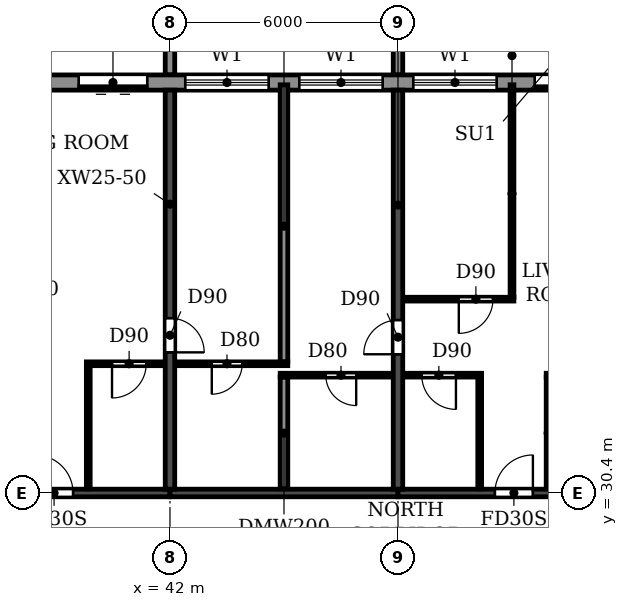
"""IFC4 building model, lengths in metres.
Left out: names, types, materials, properties, quantities, classifications, styles, units other than length and angle.
Written with IfcOpenShell. Run it as: python <this file> out.ifc"""

import sys

from ifc_helpers import new_model, si_unit, direction, frame, frame_2d, origin, place, context, subcontext, project, spatial, polyline, rectangle, outline, extrude, source, transform, mapped, element, fill, save


model = new_model("IFC4")
c1 = context("Model", 3, precision=1e-05, world=origin(), true_north=direction((0.0, 1.0)))
c2 = subcontext(c1, "Body", "Model", "MODEL_VIEW")
j1 = project(units=[si_unit("LENGTHUNIT", "METRE"), si_unit("PLANEANGLEUNIT", "RADIAN")], contexts=[c1])
p1 = place(None, origin())
s1 = spatial("IfcSite", under=j1, at=p1, CompositionType="ELEMENT")
p2 = place(p1, origin())
s2 = spatial("IfcBuilding", under=s1, at=p2, CompositionType="ELEMENT")
p3 = place(p2, frame((0.0, 0.0, 257.7)))
s3 = spatial("IfcBuildingStorey", under=s2, at=p3, CompositionType="ELEMENT", Elevation=257.7)
p4 = place(p3, frame((42.0, 30.5, 0.0), z_axis=(0.0, 0.0, 1.0), x_axis=(0.0, 1.0, 0.0)))
e1 = element("IfcWall", 1, at=p4, inside=s3, PredefinedType="SHEAR", context=c2, shape_type="SweptSolid", body=[
    extrude(rectangle(XDim=10.5, YDim=0.25, at=frame_2d((5.25, 0.0))), origin(), (0.0, 0.0, 1.0), 3.0),
])
p5 = place(p4, frame((3.6, 0.0, 0.0)))
e2 = element("IfcOpeningElement", 2, at=p5, cuts=e1, PredefinedType="OPENING", context=c2, shape_type="SweptSolid", body=[
    extrude(rectangle(XDim=0.9, YDim=2.1, at=frame_2d((0.45, 1.05))), frame((0.0, 0.135, 0.0), z_axis=(0.0, -1.0, 0.0), x_axis=(1.0, 0.0, 0.0)), (0.0, 0.0, 1.0), 0.27),
])
p6 = place(p3, frame((48.0, 30.5, 0.0), z_axis=(0.0, 0.0, 1.0), x_axis=(0.0, 1.0, 0.0)))
e3 = element("IfcWall", 3, at=p6, inside=s3, PredefinedType="SHEAR", context=c2, shape_type="SweptSolid", body=[
    extrude(rectangle(XDim=10.5, YDim=0.25, at=frame_2d((5.25, 0.0))), origin(), (0.0, 0.0, 1.0), 3.0),
])
p7 = place(p6, frame((3.55, 0.0, 0.0)))
e4 = element("IfcOpeningElement", 4, at=p7, cuts=e3, PredefinedType="OPENING", context=c2, shape_type="SweptSolid", body=[
    extrude(rectangle(XDim=0.9, YDim=2.1, at=frame_2d((0.45, 1.05))), frame((0.0, 0.135, 0.0), z_axis=(0.0, -1.0, 0.0), x_axis=(1.0, 0.0, 0.0)), (0.0, 0.0, 1.0), 0.27),
])
p8 = place(p3, frame((36.0, 30.4, 0.0), z_axis=(0.0, 0.0, 1.0), x_axis=(1.0, 0.0, 0.0)))
e5 = element("IfcWall", 5, at=p8, inside=s3, PredefinedType="SHEAR", context=c2, shape_type="SweptSolid", body=[
    extrude(rectangle(XDim=6.0, YDim=0.2, at=frame_2d((3.0, 0.0))), origin(), (0.0, 0.0, 1.0), 2.4),
])
p9 = place(p8, frame((2.45, 0.0, 0.0)))
e6 = element("IfcOpeningElement", 6, at=p9, cuts=e5, PredefinedType="OPENING", context=c2, shape_type="SweptSolid", body=[
    extrude(rectangle(XDim=1.0, YDim=2.1, at=frame_2d((0.5, 1.05))), frame((0.0, 0.11, 0.0), z_axis=(0.0, -1.0, 0.0), x_axis=(1.0, 0.0, 0.0)), (0.0, 0.0, 1.0), 0.22),
])
p10 = place(p3, frame((42.0, 30.4, 0.0), z_axis=(0.0, 0.0, 1.0), x_axis=(1.0, 0.0, 0.0)))
e7 = element("IfcWall", 7, at=p10, inside=s3, PredefinedType="SHEAR", context=c2, shape_type="SweptSolid", body=[
    extrude(rectangle(XDim=6.0, YDim=0.2, at=frame_2d((3.0, 0.0))), origin(), (0.0, 0.0, 1.0), 2.4),
])
p11 = place(p3, frame((48.0, 30.4, 0.0), z_axis=(0.0, 0.0, 1.0), x_axis=(1.0, 0.0, 0.0)))
e8 = element("IfcWall", 8, at=p11, inside=s3, PredefinedType="SHEAR", context=c2, shape_type="SweptSolid", body=[
    extrude(rectangle(XDim=6.0, YDim=0.2, at=frame_2d((3.0, 0.0))), origin(), (0.0, 0.0, 1.0), 2.4),
])
p12 = place(p11, frame((2.55, 0.0, 0.0)))
e9 = element("IfcOpeningElement", 9, at=p12, cuts=e8, PredefinedType="OPENING", context=c2, shape_type="SweptSolid", body=[
    extrude(rectangle(XDim=1.0, YDim=2.1, at=frame_2d((0.5, 1.05))), frame((0.0, 0.11, 0.0), z_axis=(0.0, -1.0, 0.0), x_axis=(1.0, 0.0, 0.0)), (0.0, 0.0, 1.0), 0.22),
])
p13 = place(p3, frame((79.317, 41.2, 0.0), z_axis=(0.0, 0.0, 1.0), x_axis=(-1.0, 0.0, 0.0)))
e10 = element("IfcWall", 10, at=p13, inside=s3, PredefinedType="STANDARD", context=c2, shape_type="SweptSolid", body=[
    extrude(rectangle(XDim=56.634, YDim=0.4, at=frame_2d((28.317, 0.0))), origin(), (0.0, 0.0, 1.0), 3.0),
])
p14 = place(p13, frame((52.717, 0.0, 0.9)))
e11 = element("IfcOpeningElement", 11, at=p14, cuts=e10, PredefinedType="OPENING", context=c2, shape_type="SweptSolid", body=[
    extrude(rectangle(XDim=2.2, YDim=1.5, at=frame_2d((1.1, 0.75))), frame((0.0, 0.21, 0.0), z_axis=(0.0, -1.0, 0.0), x_axis=(1.0, 0.0, 0.0)), (0.0, 0.0, 1.0), 0.42),
])
p15 = place(p13, frame((49.717, 0.0, 0.9)))
e12 = element("IfcOpeningElement", 12, at=p15, cuts=e10, PredefinedType="OPENING", context=c2, shape_type="SweptSolid", body=[
    extrude(rectangle(XDim=2.2, YDim=1.5, at=frame_2d((1.1, 0.75))), frame((0.0, 0.21, 0.0), z_axis=(0.0, -1.0, 0.0), x_axis=(1.0, 0.0, 0.0)), (0.0, 0.0, 1.0), 0.42),
])
p16 = place(p13, frame((46.717, 0.0, 0.9)))
e13 = element("IfcOpeningElement", 13, at=p16, cuts=e10, PredefinedType="OPENING", context=c2, shape_type="SweptSolid", body=[
    extrude(rectangle(XDim=2.2, YDim=1.5, at=frame_2d((1.1, 0.75))), frame((0.0, 0.21, 0.0), z_axis=(0.0, -1.0, 0.0), x_axis=(1.0, 0.0, 0.0)), (0.0, 0.0, 1.0), 0.42),
])
p17 = place(p13, frame((43.917, 0.0, 0.0)))
e14 = element("IfcOpeningElement", 14, at=p17, cuts=e10, PredefinedType="OPENING", context=c2, shape_type="SweptSolid", body=[
    extrude(rectangle(XDim=1.8, YDim=2.4, at=frame_2d((0.9, 1.2))), frame((0.0, 0.21, 0.0), z_axis=(0.0, -1.0, 0.0), x_axis=(1.0, 0.0, 0.0)), (0.0, 0.0, 1.0), 0.42),
])
p18 = place(p13, frame((40.717, 0.0, 0.9)))
e15 = element("IfcOpeningElement", 15, at=p18, cuts=e10, PredefinedType="OPENING", context=c2, shape_type="SweptSolid", body=[
    extrude(rectangle(XDim=2.2, YDim=1.5, at=frame_2d((1.1, 0.75))), frame((0.0, 0.21, 0.0), z_axis=(0.0, -1.0, 0.0), x_axis=(1.0, 0.0, 0.0)), (0.0, 0.0, 1.0), 0.42),
])
p19 = place(p13, frame((37.917, 0.0, 0.0)))
e16 = element("IfcOpeningElement", 16, at=p19, cuts=e10, PredefinedType="OPENING", context=c2, shape_type="SweptSolid", body=[
    extrude(rectangle(XDim=1.8, YDim=2.4, at=frame_2d((0.9, 1.2))), frame((0.0, 0.21, 0.0), z_axis=(0.0, -1.0, 0.0), x_axis=(1.0, 0.0, 0.0)), (0.0, 0.0, 1.0), 0.42),
])
p20 = place(p13, frame((34.717, 0.0, 0.9)))
e17 = element("IfcOpeningElement", 17, at=p20, cuts=e10, PredefinedType="OPENING", context=c2, shape_type="SweptSolid", body=[
    extrude(rectangle(XDim=2.2, YDim=1.5, at=frame_2d((1.1, 0.75))), frame((0.0, 0.21, 0.0), z_axis=(0.0, -1.0, 0.0), x_axis=(1.0, 0.0, 0.0)), (0.0, 0.0, 1.0), 0.42),
])
p21 = place(p13, frame((31.717, 0.0, 0.9)))
e18 = element("IfcOpeningElement", 18, at=p21, cuts=e10, PredefinedType="OPENING", context=c2, shape_type="SweptSolid", body=[
    extrude(rectangle(XDim=2.2, YDim=1.5, at=frame_2d((1.1, 0.75))), frame((0.0, 0.21, 0.0), z_axis=(0.0, -1.0, 0.0), x_axis=(1.0, 0.0, 0.0)), (0.0, 0.0, 1.0), 0.42),
])
p22 = place(p13, frame((28.717, 0.0, 0.9)))
e19 = element("IfcOpeningElement", 19, at=p22, cuts=e10, PredefinedType="OPENING", context=c2, shape_type="SweptSolid", body=[
    extrude(rectangle(XDim=2.2, YDim=1.5, at=frame_2d((1.1, 0.75))), frame((0.0, 0.21, 0.0), z_axis=(0.0, -1.0, 0.0), x_axis=(1.0, 0.0, 0.0)), (0.0, 0.0, 1.0), 0.42),
])
p23 = place(p13, frame((25.917, 0.0, 0.0)))
e20 = element("IfcOpeningElement", 20, at=p23, cuts=e10, PredefinedType="OPENING", context=c2, shape_type="SweptSolid", body=[
    extrude(rectangle(XDim=1.8, YDim=2.4, at=frame_2d((0.9, 1.2))), frame((0.0, 0.21, 0.0), z_axis=(0.0, -1.0, 0.0), x_axis=(1.0, 0.0, 0.0)), (0.0, 0.0, 1.0), 0.42),
])
p24 = place(p13, frame((22.917, 0.0, 0.0)))
e21 = element("IfcOpeningElement", 21, at=p24, cuts=e10, PredefinedType="OPENING", context=c2, shape_type="SweptSolid", body=[
    extrude(rectangle(XDim=1.8, YDim=2.4, at=frame_2d((0.9, 1.2))), frame((0.0, 0.21, 0.0), z_axis=(0.0, -1.0, 0.0), x_axis=(1.0, 0.0, 0.0)), (0.0, 0.0, 1.0), 0.42),
])
p25 = place(p13, frame((19.717, 0.0, 0.9)))
e22 = element("IfcOpeningElement", 22, at=p25, cuts=e10, PredefinedType="OPENING", context=c2, shape_type="SweptSolid", body=[
    extrude(rectangle(XDim=2.2, YDim=1.5, at=frame_2d((1.1, 0.75))), frame((0.0, 0.21, 0.0), z_axis=(0.0, -1.0, 0.0), x_axis=(1.0, 0.0, 0.0)), (0.0, 0.0, 1.0), 0.42),
])
p26 = place(p13, frame((16.717, 0.0, 0.9)))
e23 = element("IfcOpeningElement", 23, at=p26, cuts=e10, PredefinedType="OPENING", context=c2, shape_type="SweptSolid", body=[
    extrude(rectangle(XDim=2.2, YDim=1.5, at=frame_2d((1.1, 0.75))), frame((0.0, 0.21, 0.0), z_axis=(0.0, -1.0, 0.0), x_axis=(1.0, 0.0, 0.0)), (0.0, 0.0, 1.0), 0.42),
])
p27 = place(p13, frame((13.717, 0.0, 0.9)))
e24 = element("IfcOpeningElement", 24, at=p27, cuts=e10, PredefinedType="OPENING", context=c2, shape_type="SweptSolid", body=[
    extrude(rectangle(XDim=2.2, YDim=1.5, at=frame_2d((1.1, 0.75))), frame((0.0, 0.21, 0.0), z_axis=(0.0, -1.0, 0.0), x_axis=(1.0, 0.0, 0.0)), (0.0, 0.0, 1.0), 0.42),
])
p28 = place(p13, frame((10.717, 0.0, 0.9)))
e25 = element("IfcOpeningElement", 25, at=p28, cuts=e10, PredefinedType="OPENING", context=c2, shape_type="SweptSolid", body=[
    extrude(rectangle(XDim=2.2, YDim=1.5, at=frame_2d((1.1, 0.75))), frame((0.0, 0.21, 0.0), z_axis=(0.0, -1.0, 0.0), x_axis=(1.0, 0.0, 0.0)), (0.0, 0.0, 1.0), 0.42),
])
p29 = place(p13, frame((7.917, 0.0, 0.0)))
e26 = element("IfcOpeningElement", 26, at=p29, cuts=e10, PredefinedType="OPENING", context=c2, shape_type="SweptSolid", body=[
    extrude(rectangle(XDim=1.8, YDim=2.4, at=frame_2d((0.9, 1.2))), frame((0.0, 0.21, 0.0), z_axis=(0.0, -1.0, 0.0), x_axis=(1.0, 0.0, 0.0)), (0.0, 0.0, 1.0), 0.42),
])
p30 = place(p13, frame((4.717, 0.0, 0.9)))
e27 = element("IfcOpeningElement", 27, at=p30, cuts=e10, PredefinedType="OPENING", context=c2, shape_type="SweptSolid", body=[
    extrude(rectangle(XDim=2.2, YDim=1.5, at=frame_2d((1.1, 0.75))), frame((0.0, 0.21, 0.0), z_axis=(0.0, -1.0, 0.0), x_axis=(1.0, 0.0, 0.0)), (0.0, 0.0, 1.0), 0.42),
])
p31 = place(p13, frame((1.917, 0.0, 0.0)))
e28 = element("IfcOpeningElement", 28, at=p31, cuts=e10, PredefinedType="OPENING", context=c2, shape_type="SweptSolid", body=[
    extrude(rectangle(XDim=1.8, YDim=2.4, at=frame_2d((0.9, 1.2))), frame((0.0, 0.21, 0.0), z_axis=(0.0, -1.0, 0.0), x_axis=(1.0, 0.0, 0.0)), (0.0, 0.0, 1.0), 0.42),
])
m1 = source(origin(), c2, "Body", "SweptSolid", [
    extrude(outline(polyline([(0.0, 0.0), (0.25, 0.0), (0.25, 3.1), (0.0, 3.1), (0.0, 0.0)])), origin(), (0.0, 0.0, 1.0), 3.1),
])
for number, where in (
    (29, (41.875, 41.4, 0.0)),
    (30, (47.875, 41.4, 0.0)),
):
    element("IfcWall", number, at=place(p3, frame(where)), inside=s3, PredefinedType="STANDARD", context=c2, shape_type="MappedRepresentation", body=[
        mapped(m1, transform((0.0, 0.0, 0.0))),
    ])
p32 = place(p3, frame((45.0, 30.51, 0.0), z_axis=(0.0, 0.0, 1.0), x_axis=(0.0, 1.0, 0.0)))
e31 = element("IfcWall", 31, at=p32, inside=s3, PredefinedType="PARTITIONING", context=c2, shape_type="SweptSolid", body=[
    extrude(rectangle(XDim=2.94, YDim=0.2, at=frame_2d((1.47, 0.0))), origin(), (0.0, 0.0, 1.0), 3.0),
])
p33 = place(p3, frame((45.0, 33.85, 0.0), z_axis=(0.0, 0.0, 1.0), x_axis=(0.0, 1.0, 0.0)))
e32 = element("IfcWall", 32, at=p33, inside=s3, PredefinedType="PARTITIONING", context=c2, shape_type="SweptSolid", body=[
    extrude(rectangle(XDim=7.29, YDim=0.2, at=frame_2d((3.645, 0.0))), origin(), (0.0, 0.0, 1.0), 3.0),
])
p34 = place(p3, frame((44.9, 33.5, 0.0), z_axis=(0.0, 0.0, 1.0), x_axis=(1.0, 0.0, 0.0)))
e33 = element("IfcWall", 33, at=p34, inside=s3, PredefinedType="PARTITIONING", context=c2, shape_type="SweptSolid", body=[
    extrude(rectangle(XDim=2.965, YDim=0.1, at=frame_2d((1.482, 0.0))), origin(), (0.0, 0.0, 1.0), 3.0),
])
p35 = place(p34, frame((1.2, 0.0, 0.0)))
e34 = element("IfcOpeningElement", 34, at=p35, cuts=e33, PredefinedType="OPENING", context=c2, shape_type="SweptSolid", body=[
    extrude(rectangle(XDim=0.8, YDim=2.1, at=frame_2d((0.4, 1.05))), frame((0.0, 0.06, 0.0), z_axis=(0.0, -1.0, 0.0), x_axis=(1.0, 0.0, 0.0)), (0.0, 0.0, 1.0), 0.12),
])
p36 = place(p3, frame((48.135, 33.5, 0.0), z_axis=(0.0, 0.0, 1.0), x_axis=(1.0, 0.0, 0.0)))
e35 = element("IfcWall", 35, at=p36, inside=s3, PredefinedType="PARTITIONING", context=c2, shape_type="SweptSolid", body=[
    extrude(rectangle(XDim=2.065, YDim=0.1, at=frame_2d((1.032, 0.0))), origin(), (0.0, 0.0, 1.0), 3.0),
])
p37 = place(p36, frame((0.49, 0.0, 0.0)))
e36 = element("IfcOpeningElement", 36, at=p37, cuts=e35, PredefinedType="OPENING", context=c2, shape_type="SweptSolid", body=[
    extrude(rectangle(XDim=0.9, YDim=2.1, at=frame_2d((0.45, 1.05))), frame((0.0, 0.06, 0.0), z_axis=(0.0, -1.0, 0.0), x_axis=(1.0, 0.0, 0.0)), (0.0, 0.0, 1.0), 0.12),
])
p38 = place(p3, frame((51.9, 33.5, 0.0), z_axis=(0.0, 0.0, 1.0), x_axis=(1.0, 0.0, 0.0)))
e37 = element("IfcWall", 37, at=p38, inside=s3, PredefinedType="PARTITIONING", context=c2, shape_type="SweptSolid", body=[
    extrude(rectangle(XDim=1.965, YDim=0.1, at=frame_2d((0.982, 0.0))), origin(), (0.0, 0.0, 1.0), 3.0),
])
p39 = place(p38, frame((0.675, 0.0, 0.0)))
e38 = element("IfcOpeningElement", 38, at=p39, cuts=e37, PredefinedType="OPENING", context=c2, shape_type="SweptSolid", body=[
    extrude(rectangle(XDim=0.8, YDim=2.1, at=frame_2d((0.4, 1.05))), frame((0.0, 0.06, 0.0), z_axis=(0.0, -1.0, 0.0), x_axis=(1.0, 0.0, 0.0)), (0.0, 0.0, 1.0), 0.12),
])
p40 = place(p3, frame((39.8, 33.8, 0.0), z_axis=(0.0, 0.0, 1.0), x_axis=(1.0, 0.0, 0.0)))
e39 = element("IfcWall", 39, at=p40, inside=s3, PredefinedType="PARTITIONING", context=c2, shape_type="SweptSolid", body=[
    extrude(rectangle(XDim=2.065, YDim=0.1, at=frame_2d((1.032, 0.0))), origin(), (0.0, 0.0, 1.0), 3.0),
])
p41 = place(p40, frame((0.675, 0.0, 0.0)))
e40 = element("IfcOpeningElement", 40, at=p41, cuts=e39, PredefinedType="OPENING", context=c2, shape_type="SweptSolid", body=[
    extrude(rectangle(XDim=0.9, YDim=2.1, at=frame_2d((0.45, 1.05))), frame((0.0, 0.06, 0.0), z_axis=(0.0, -1.0, 0.0), x_axis=(1.0, 0.0, 0.0)), (0.0, 0.0, 1.0), 0.12),
])
p42 = place(p3, frame((42.135, 33.8, 0.0), z_axis=(0.0, 0.0, 1.0), x_axis=(1.0, 0.0, 0.0)))
e41 = element("IfcWall", 41, at=p42, inside=s3, PredefinedType="PARTITIONING", context=c2, shape_type="SweptSolid", body=[
    extrude(rectangle(XDim=2.965, YDim=0.1, at=frame_2d((1.482, 0.0))), origin(), (0.0, 0.0, 1.0), 3.0),
])
p43 = place(p42, frame((0.965, 0.0, 0.0)))
e42 = element("IfcOpeningElement", 42, at=p43, cuts=e41, PredefinedType="OPENING", context=c2, shape_type="SweptSolid", body=[
    extrude(rectangle(XDim=0.8, YDim=2.1, at=frame_2d((0.4, 1.05))), frame((0.0, 0.06, 0.0), z_axis=(0.0, -1.0, 0.0), x_axis=(1.0, 0.0, 0.0)), (0.0, 0.0, 1.0), 0.12),
])
p44 = place(p3, frame((48.135, 35.5, 0.0), z_axis=(0.0, 0.0, 1.0), x_axis=(1.0, 0.0, 0.0)))
e43 = element("IfcWall", 43, at=p44, inside=s3, PredefinedType="PARTITIONING", context=c2, shape_type="SweptSolid", body=[
    extrude(rectangle(XDim=2.915, YDim=0.1, at=frame_2d((1.458, 0.0))), origin(), (0.0, 0.0, 1.0), 3.0),
])
p45 = place(p44, frame((1.465, 0.0, 0.0)))
e44 = element("IfcOpeningElement", 44, at=p45, cuts=e43, PredefinedType="OPENING", context=c2, shape_type="SweptSolid", body=[
    extrude(rectangle(XDim=0.9, YDim=2.1, at=frame_2d((0.45, 1.05))), frame((0.0, 0.06, 0.0), z_axis=(0.0, -1.0, 0.0), x_axis=(1.0, 0.0, 0.0)), (0.0, 0.0, 1.0), 0.12),
])
p46 = place(p3, frame((39.85, 30.51, 0.0), z_axis=(0.0, 0.0, 1.0), x_axis=(0.0, 1.0, 0.0)))
e45 = element("IfcWall", 45, at=p46, inside=s3, PredefinedType="PARTITIONING", context=c2, shape_type="SweptSolid", body=[
    extrude(rectangle(XDim=3.24, YDim=0.1, at=frame_2d((1.62, 0.0))), origin(), (0.0, 0.0, 1.0), 3.0),
])
p47 = place(p3, frame((50.15, 30.51, 0.0), z_axis=(0.0, 0.0, 1.0), x_axis=(0.0, 1.0, 0.0)))
e46 = element("IfcWall", 46, at=p47, inside=s3, PredefinedType="PARTITIONING", context=c2, shape_type="SweptSolid", body=[
    extrude(rectangle(XDim=2.94, YDim=0.1, at=frame_2d((1.47, 0.0))), origin(), (0.0, 0.0, 1.0), 3.0),
])
p48 = place(p3, frame((51.0, 35.55, 0.0), z_axis=(0.0, 0.0, 1.0), x_axis=(0.0, 1.0, 0.0)))
e47 = element("IfcWall", 47, at=p48, inside=s3, PredefinedType="PARTITIONING", context=c2, shape_type="SweptSolid", body=[
    extrude(rectangle(XDim=5.59, YDim=0.1, at=frame_2d((2.795, 0.0))), origin(), (0.0, 0.0, 1.0), 3.0),
])
p49 = place(p3, frame((51.95, 30.51, 0.0), z_axis=(0.0, 0.0, 1.0), x_axis=(0.0, 1.0, 0.0)))
e48 = element("IfcWall", 48, at=p49, inside=s3, PredefinedType="PARTITIONING", context=c2, shape_type="SweptSolid", body=[
    extrude(rectangle(XDim=2.94, YDim=0.1, at=frame_2d((1.47, 0.0))), origin(), (0.0, 0.0, 1.0), 3.0),
])
p50 = place(p19, origin())
e49 = element("IfcDoor", 49, at=p50, inside=s3, OperationType="DOUBLE_DOOR_SLIDING", PredefinedType="DOOR", context=c2, shape_type="SweptSolid", body=[
    extrude(rectangle(XDim=1.8, YDim=2.4, at=frame_2d((0.9, 1.2))), frame((0.0, 0.025, 0.0), z_axis=(0.0, -1.0, 0.0), x_axis=(1.0, 0.0, 0.0)), (0.0, 0.0, 1.0), 0.05),
])
fill(e16, e49)
p51 = place(p20, origin())
e50 = element("IfcWindow", 50, at=p51, inside=s3, PartitioningType="DOUBLE_PANEL_HORIZONTAL", PredefinedType="WINDOW", context=c2, shape_type="SweptSolid", body=[
    extrude(rectangle(XDim=2.2, YDim=1.5, at=frame_2d((1.1, 0.75))), frame((0.0, 0.03, 0.0), z_axis=(0.0, -1.0, 0.0), x_axis=(1.0, 0.0, 0.0)), (0.0, 0.0, 1.0), 0.06),
])
fill(e17, e50)
p52 = place(p21, origin())
e51 = element("IfcWindow", 51, at=p52, inside=s3, PartitioningType="DOUBLE_PANEL_HORIZONTAL", PredefinedType="WINDOW", context=c2, shape_type="SweptSolid", body=[
    extrude(rectangle(XDim=2.2, YDim=1.5, at=frame_2d((1.1, 0.75))), frame((0.0, 0.03, 0.0), z_axis=(0.0, -1.0, 0.0), x_axis=(1.0, 0.0, 0.0)), (0.0, 0.0, 1.0), 0.06),
])
fill(e18, e51)
p53 = place(p22, origin())
e52 = element("IfcWindow", 52, at=p53, inside=s3, PartitioningType="DOUBLE_PANEL_HORIZONTAL", PredefinedType="WINDOW", context=c2, shape_type="SweptSolid", body=[
    extrude(rectangle(XDim=2.2, YDim=1.5, at=frame_2d((1.1, 0.75))), frame((0.0, 0.03, 0.0), z_axis=(0.0, -1.0, 0.0), x_axis=(1.0, 0.0, 0.0)), (0.0, 0.0, 1.0), 0.06),
])
fill(e19, e52)
p54 = place(p23, origin())
e53 = element("IfcDoor", 53, at=p54, inside=s3, OperationType="DOUBLE_DOOR_SLIDING", PredefinedType="DOOR", context=c2, shape_type="SweptSolid", body=[
    extrude(rectangle(XDim=1.8, YDim=2.4, at=frame_2d((0.9, 1.2))), frame((0.0, 0.025, 0.0), z_axis=(0.0, -1.0, 0.0), x_axis=(1.0, 0.0, 0.0)), (0.0, 0.0, 1.0), 0.05),
])
fill(e20, e53)
p55 = place(p43, frame((0.8, 0.0, 0.0), z_axis=(0.0, 0.0, 1.0), x_axis=(-1.0, 0.0, 0.0)))
e54 = element("IfcDoor", 54, at=p55, inside=s3, OperationType="SINGLE_SWING_RIGHT", PredefinedType="DOOR", context=c2, shape_type="SweptSolid", body=[
    extrude(rectangle(XDim=0.8, YDim=2.1, at=frame_2d((0.4, 1.05))), frame((0.0, 0.025, 0.0), z_axis=(0.0, -1.0, 0.0), x_axis=(1.0, 0.0, 0.0)), (0.0, 0.0, 1.0), 0.05),
])
fill(e42, e54)
p56 = place(p9, origin())
e55 = element("IfcDoor", 55, at=p56, inside=s3, OperationType="SINGLE_SWING_LEFT", PredefinedType="DOOR", context=c2, shape_type="SweptSolid", body=[
    extrude(rectangle(XDim=1.0, YDim=2.1, at=frame_2d((0.5, 1.05))), frame((0.0, 0.025, 0.0), z_axis=(0.0, -1.0, 0.0), x_axis=(1.0, 0.0, 0.0)), (0.0, 0.0, 1.0), 0.05),
])
fill(e6, e55)
p57 = place(p41, frame((0.9, 0.0, 0.0), z_axis=(0.0, 0.0, 1.0), x_axis=(-1.0, 0.0, 0.0)))
e56 = element("IfcDoor", 56, at=p57, inside=s3, OperationType="SINGLE_SWING_RIGHT", PredefinedType="DOOR", context=c2, shape_type="SweptSolid", body=[
    extrude(rectangle(XDim=0.9, YDim=2.1, at=frame_2d((0.45, 1.05))), frame((0.0, 0.025, 0.0), z_axis=(0.0, -1.0, 0.0), x_axis=(1.0, 0.0, 0.0)), (0.0, 0.0, 1.0), 0.05),
])
fill(e40, e56)
p58 = place(p5, frame((0.9, 0.0, 0.0), z_axis=(0.0, 0.0, 1.0), x_axis=(-1.0, 0.0, 0.0)))
e57 = element("IfcDoor", 57, at=p58, inside=s3, OperationType="SINGLE_SWING_RIGHT", PredefinedType="DOOR", context=c2, shape_type="SweptSolid", body=[
    extrude(rectangle(XDim=0.9, YDim=2.1, at=frame_2d((0.45, 1.05))), frame((0.0, 0.025, 0.0), z_axis=(0.0, -1.0, 0.0), x_axis=(1.0, 0.0, 0.0)), (0.0, 0.0, 1.0), 0.05),
])
fill(e2, e57)
p59 = place(p35, frame((0.8, 0.0, 0.0), z_axis=(0.0, 0.0, 1.0), x_axis=(-1.0, 0.0, 0.0)))
e58 = element("IfcDoor", 58, at=p59, inside=s3, OperationType="SINGLE_SWING_LEFT", PredefinedType="DOOR", context=c2, shape_type="SweptSolid", body=[
    extrude(rectangle(XDim=0.8, YDim=2.1, at=frame_2d((0.4, 1.05))), frame((0.0, 0.025, 0.0), z_axis=(0.0, -1.0, 0.0), x_axis=(1.0, 0.0, 0.0)), (0.0, 0.0, 1.0), 0.05),
])
fill(e34, e58)
p60 = place(p7, origin())
e59 = element("IfcDoor", 59, at=p60, inside=s3, OperationType="SINGLE_SWING_LEFT", PredefinedType="DOOR", context=c2, shape_type="SweptSolid", body=[
    extrude(rectangle(XDim=0.9, YDim=2.1, at=frame_2d((0.45, 1.05))), frame((0.0, 0.025, 0.0), z_axis=(0.0, -1.0, 0.0), x_axis=(1.0, 0.0, 0.0)), (0.0, 0.0, 1.0), 0.05),
])
fill(e4, e59)
p61 = place(p37, frame((0.9, 0.0, 0.0), z_axis=(0.0, 0.0, 1.0), x_axis=(-1.0, 0.0, 0.0)))
e60 = element("IfcDoor", 60, at=p61, inside=s3, OperationType="SINGLE_SWING_LEFT", PredefinedType="DOOR", context=c2, shape_type="SweptSolid", body=[
    extrude(rectangle(XDim=0.9, YDim=2.1, at=frame_2d((0.45, 1.05))), frame((0.0, 0.025, 0.0), z_axis=(0.0, -1.0, 0.0), x_axis=(1.0, 0.0, 0.0)), (0.0, 0.0, 1.0), 0.05),
])
fill(e36, e60)
p62 = place(p45, frame((0.9, 0.0, 0.0), z_axis=(0.0, 0.0, 1.0), x_axis=(-1.0, 0.0, 0.0)))
e61 = element("IfcDoor", 61, at=p62, inside=s3, OperationType="SINGLE_SWING_RIGHT", PredefinedType="DOOR", context=c2, shape_type="SweptSolid", body=[
    extrude(rectangle(XDim=0.9, YDim=2.1, at=frame_2d((0.45, 1.05))), frame((0.0, 0.025, 0.0), z_axis=(0.0, -1.0, 0.0), x_axis=(1.0, 0.0, 0.0)), (0.0, 0.0, 1.0), 0.05),
])
fill(e44, e61)
p63 = place(p12, origin())
e62 = element("IfcDoor", 62, at=p63, inside=s3, OperationType="SINGLE_SWING_RIGHT", PredefinedType="DOOR", context=c2, shape_type="SweptSolid", body=[
    extrude(rectangle(XDim=1.0, YDim=2.1, at=frame_2d((0.5, 1.05))), frame((0.0, 0.025, 0.0), z_axis=(0.0, -1.0, 0.0), x_axis=(1.0, 0.0, 0.0)), (0.0, 0.0, 1.0), 0.05),
])
fill(e9, e62)
save(model, sys.argv[1])
